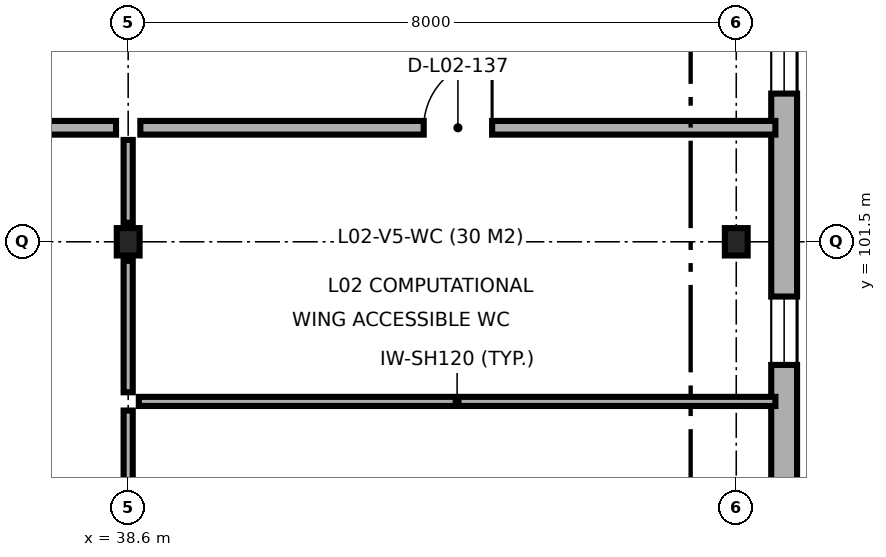
"""IFC4 building model, lengths in metres.
Left out: names, types, materials, properties, quantities, classifications, styles, units other than length and angle.
Written with IfcOpenShell. Run it as: python <this file> out.ifc"""

import sys

from ifc_helpers import new_model, si_unit, direction, frame, frame_2d, origin, origin_2d, place, context, subcontext, project, spatial, rectangle, i_section, extrude, element, fill, save


model = new_model("IFC4")
c1 = context("Model", 3, precision=1e-05, world=origin(), true_north=direction((0.0, 1.0)))
c2 = subcontext(c1, "Body", "Model", "MODEL_VIEW")
j1 = project(units=[si_unit("LENGTHUNIT", "METRE"), si_unit("PLANEANGLEUNIT", "RADIAN")], contexts=[c1])
p1 = place(None, origin())
s1 = spatial("IfcSite", under=j1, at=p1, CompositionType="ELEMENT")
p2 = place(p1, origin())
s2 = spatial("IfcBuilding", under=s1, at=p2, CompositionType="ELEMENT")
p3 = place(p2, frame((0.0, 0.0, 9.3)))
s3 = spatial("IfcBuildingStorey", under=s2, at=p3, CompositionType="ELEMENT", Elevation=9.3)
for number, where, z_axis, x_axis in (
    (1, (38.6, 101.5, 0.0), (0.0, 0.0, 1.0), (1.0, 0.0, 0.0)),
    (2, (46.6, 101.5, 0.0), (0.0, 0.0, 1.0), (1.0, 0.0, 0.0)),
):
    element("IfcColumn", number, at=place(p3, frame(where, z_axis=z_axis, x_axis=x_axis)), inside=s3, PredefinedType="COLUMN", context=c2, shape_type="SweptSolid", body=[
        extrude(i_section(OverallWidth=0.3, OverallDepth=0.36, WebThickness=0.012, FlangeThickness=0.022, FilletRadius=0.027, at=origin_2d()), origin(), (0.0, 0.0, 1.0), 4.5),
    ])
p4 = place(p3, frame((47.23, 88.623, 0.0), z_axis=(0.0, 0.0, 1.0), x_axis=(0.0, 1.0, 0.0)))
e3 = element("IfcWall", 3, at=p4, inside=s3, PredefinedType="SOLIDWALL", context=c2, shape_type="SweptSolid", body=[
    extrude(rectangle(XDim=27.477, YDim=0.34, at=frame_2d((13.739, 0.0))), origin(), (0.0, 0.0, 1.0), 4.25),
])
p5 = place(p4, frame((1.364, 0.0, 0.9)))
e4 = element("IfcOpeningElement", 4, at=p5, cuts=e3, PredefinedType="OPENING", context=c2, shape_type="SweptSolid", body=[
    extrude(rectangle(XDim=2.25, YDim=1.95, at=frame_2d((1.125, 0.975))), frame((0.0, 0.18, 0.0), z_axis=(0.0, -1.0, 0.0), x_axis=(1.0, 0.0, 0.0)), (0.0, 0.0, 1.0), 0.36),
])
p6 = place(p4, frame((6.522, 0.0, 0.9)))
e5 = element("IfcOpeningElement", 5, at=p6, cuts=e3, PredefinedType="OPENING", context=c2, shape_type="SweptSolid", body=[
    extrude(rectangle(XDim=2.85, YDim=1.95, at=frame_2d((1.425, 0.975))), frame((0.0, 0.18, 0.0), z_axis=(0.0, -1.0, 0.0), x_axis=(1.0, 0.0, 0.0)), (0.0, 0.0, 1.0), 0.36),
])
p7 = place(p4, frame((11.257, 0.0, 0.9)))
e6 = element("IfcOpeningElement", 6, at=p7, cuts=e3, PredefinedType="OPENING", context=c2, shape_type="SweptSolid", body=[
    extrude(rectangle(XDim=0.9, YDim=1.8, at=frame_2d((0.45, 0.9))), frame((0.0, 0.18, 0.0), z_axis=(0.0, -1.0, 0.0), x_axis=(1.0, 0.0, 0.0)), (0.0, 0.0, 1.0), 0.36),
])
p8 = place(p4, frame((14.827, 0.0, 0.9)))
e7 = element("IfcOpeningElement", 7, at=p8, cuts=e3, PredefinedType="OPENING", context=c2, shape_type="SweptSolid", body=[
    extrude(rectangle(XDim=1.5, YDim=1.8, at=frame_2d((0.75, 0.9))), frame((0.0, 0.18, 0.0), z_axis=(0.0, -1.0, 0.0), x_axis=(1.0, 0.0, 0.0)), (0.0, 0.0, 1.0), 0.36),
])
p9 = place(p4, frame((17.657, 0.0, 0.9)))
e8 = element("IfcOpeningElement", 8, at=p9, cuts=e3, PredefinedType="OPENING", context=c2, shape_type="SweptSolid", body=[
    extrude(rectangle(XDim=2.1, YDim=1.8, at=frame_2d((1.05, 0.9))), frame((0.0, 0.18, 0.0), z_axis=(0.0, -1.0, 0.0), x_axis=(1.0, 0.0, 0.0)), (0.0, 0.0, 1.0), 0.36),
])
p10 = place(p4, frame((22.517, 0.0, 0.9)))
e9 = element("IfcOpeningElement", 9, at=p10, cuts=e3, PredefinedType="OPENING", context=c2, shape_type="SweptSolid", body=[
    extrude(rectangle(XDim=2.7, YDim=1.8, at=frame_2d((1.35, 0.9))), frame((0.0, 0.18, 0.0), z_axis=(0.0, -1.0, 0.0), x_axis=(1.0, 0.0, 0.0)), (0.0, 0.0, 1.0), 0.36),
])
p11 = place(p3, frame((38.74, 99.4, 0.0), z_axis=(0.0, 0.0, 1.0), x_axis=(1.0, 0.0, 0.0)))
e10 = element("IfcWall", 10, at=p11, inside=s3, PredefinedType="PARTITIONING", context=c2, shape_type="SweptSolid", body=[
    extrude(rectangle(XDim=8.375, YDim=0.12, at=frame_2d((4.188, 0.0))), origin(), (0.0, 0.0, 1.0), 4.25),
])
p12 = place(p3, frame((38.6, 93.75, 0.0), z_axis=(0.0, 0.0, 1.0), x_axis=(0.0, 1.0, 0.0)))
e11 = element("IfcWall", 11, at=p12, inside=s3, PredefinedType="PARTITIONING", context=c2, shape_type="SweptSolid", body=[
    extrude(rectangle(XDim=5.53, YDim=0.12, at=frame_2d((2.765, 0.0))), origin(), (0.0, 0.0, 1.0), 3.85),
])
p13 = place(p3, frame((38.6, 99.52, 0.0), z_axis=(0.0, 0.0, 1.0), x_axis=(0.0, 1.0, 0.0)))
e12 = element("IfcWall", 12, at=p13, inside=s3, PredefinedType="PARTITIONING", context=c2, shape_type="SweptSolid", body=[
    extrude(rectangle(XDim=1.73, YDim=0.12, at=frame_2d((0.865, 0.0))), origin(), (0.0, 0.0, 1.0), 3.85),
])
p14 = place(p3, frame((38.6, 101.75, 0.0), z_axis=(0.0, 0.0, 1.0), x_axis=(0.0, 1.0, 0.0)))
e13 = element("IfcWall", 13, at=p14, inside=s3, PredefinedType="PARTITIONING", context=c2, shape_type="SweptSolid", body=[
    extrude(rectangle(XDim=1.09, YDim=0.12, at=frame_2d((0.545, 0.0))), origin(), (0.0, 0.0, 1.0), 3.85),
])
p15 = place(p3, frame((27.76, 103.0, 0.0), z_axis=(0.0, 0.0, 1.0), x_axis=(1.0, 0.0, 0.0)))
e14 = element("IfcWall", 14, at=p15, inside=s3, PredefinedType="PARTITIONING", context=c2, shape_type="SweptSolid", body=[
    extrude(rectangle(XDim=10.68, YDim=0.18, at=frame_2d((5.34, 0.0))), origin(), (0.0, 0.0, 1.0), 4.25),
])
p16 = place(p15, frame((4.79, 0.0, 0.0)))
e15 = element("IfcOpeningElement", 15, at=p16, cuts=e14, PredefinedType="OPENING", context=c2, shape_type="SweptSolid", body=[
    extrude(rectangle(XDim=1.1, YDim=2.15, at=frame_2d((0.55, 1.075))), frame((0.0, 0.1, 0.0), z_axis=(0.0, -1.0, 0.0), x_axis=(1.0, 0.0, 0.0)), (0.0, 0.0, 1.0), 0.2),
])
p17 = place(p3, frame((38.76, 103.0, 0.0), z_axis=(0.0, 0.0, 1.0), x_axis=(1.0, 0.0, 0.0)))
e16 = element("IfcWall", 16, at=p17, inside=s3, PredefinedType="PARTITIONING", context=c2, shape_type="SweptSolid", body=[
    extrude(rectangle(XDim=8.355, YDim=0.18, at=frame_2d((4.177, 0.0))), origin(), (0.0, 0.0, 1.0), 4.25),
])
p18 = place(p17, frame((3.728, 0.0, 0.0)))
e17 = element("IfcOpeningElement", 17, at=p18, cuts=e16, PredefinedType="OPENING", context=c2, shape_type="SweptSolid", body=[
    extrude(rectangle(XDim=0.9, YDim=2.1, at=frame_2d((0.45, 1.05))), frame((0.0, 0.1, 0.0), z_axis=(0.0, -1.0, 0.0), x_axis=(1.0, 0.0, 0.0)), (0.0, 0.0, 1.0), 0.2),
])
p19 = place(p7, origin())
e18 = element("IfcWindow", 18, at=p19, inside=s3, PartitioningType="SINGLE_PANEL", PredefinedType="WINDOW", context=c2, shape_type="SweptSolid", body=[
    extrude(rectangle(XDim=0.9, YDim=1.8, at=frame_2d((0.45, 0.9))), frame((0.0, 0.03, 0.0), z_axis=(0.0, -1.0, 0.0), x_axis=(1.0, 0.0, 0.0)), (0.0, 0.0, 1.0), 0.06),
])
fill(e6, e18)
p20 = place(p8, origin())
e19 = element("IfcWindow", 19, at=p20, inside=s3, PartitioningType="SINGLE_PANEL", PredefinedType="WINDOW", context=c2, shape_type="SweptSolid", body=[
    extrude(rectangle(XDim=1.5, YDim=1.8, at=frame_2d((0.75, 0.9))), frame((0.0, 0.03, 0.0), z_axis=(0.0, -1.0, 0.0), x_axis=(1.0, 0.0, 0.0)), (0.0, 0.0, 1.0), 0.06),
])
fill(e7, e19)
p21 = place(p18, origin())
e20 = element("IfcDoor", 20, at=p21, inside=s3, OperationType="SINGLE_SWING_RIGHT", PredefinedType="DOOR", context=c2, shape_type="SweptSolid", body=[
    extrude(rectangle(XDim=0.9, YDim=2.1, at=frame_2d((0.45, 1.05))), frame((0.0, 0.025, 0.0), z_axis=(0.0, -1.0, 0.0), x_axis=(1.0, 0.0, 0.0)), (0.0, 0.0, 1.0), 0.05),
])
fill(e17, e20)
save(model, sys.argv[1])
